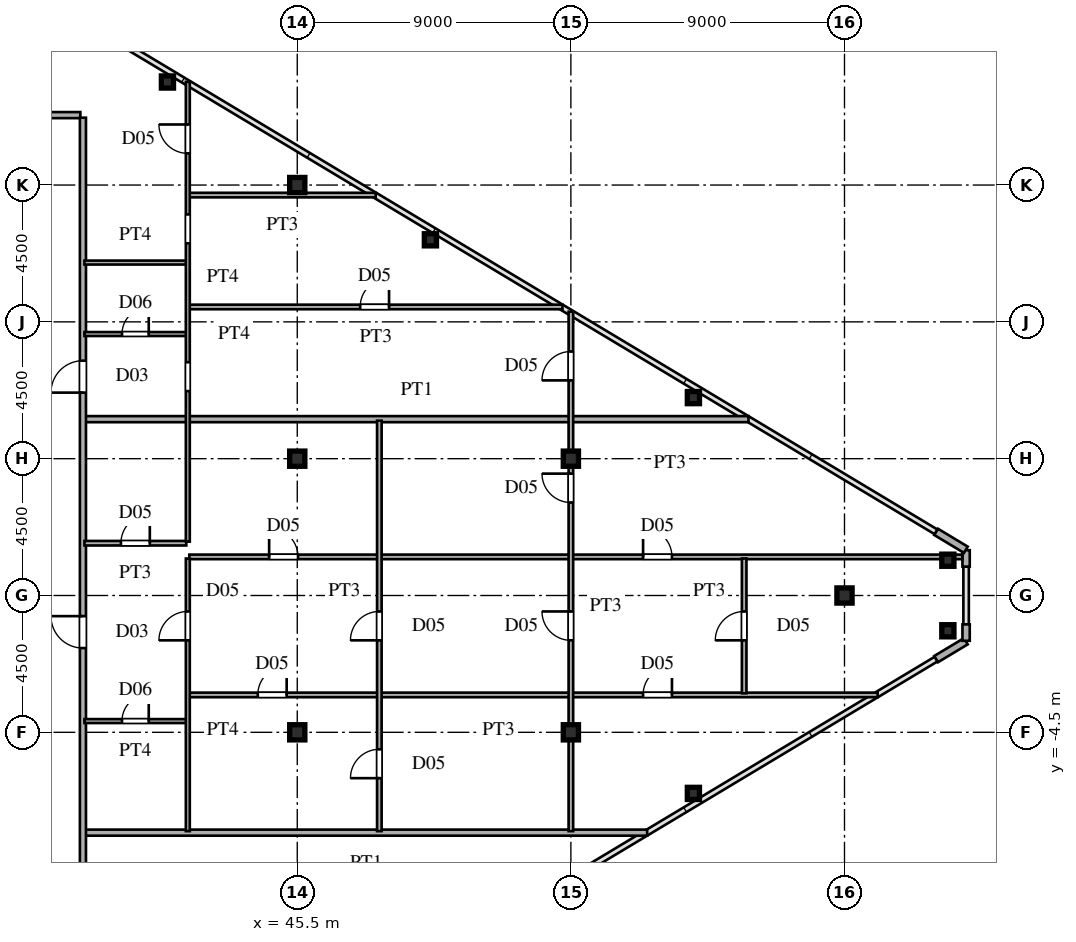
"""IFC4 building model, lengths in metres.
Left out: names, types, materials, properties, quantities, classifications, styles, units other than length and angle.
Written with IfcOpenShell. Run it as: python <this file> out.ifc"""

import sys

from ifc_helpers import new_model, si_unit, direction, frame, frame_2d, origin, origin_2d, place, context, subcontext, project, spatial, rectangle, hollow_rectangle, i_section, extrude, source, transform, mapped, element, fill, save


model = new_model("IFC4")
c1 = context("Model", 3, precision=1e-05, world=origin(), true_north=direction((0.0, 1.0)))
c2 = subcontext(c1, "Body", "Model", "MODEL_VIEW")
j1 = project(units=[si_unit("LENGTHUNIT", "METRE"), si_unit("PLANEANGLEUNIT", "RADIAN")], contexts=[c1])
p1 = place(None, origin())
s1 = spatial("IfcSite", under=j1, at=p1, CompositionType="ELEMENT")
p2 = place(p1, origin())
s2 = spatial("IfcBuilding", under=s1, at=p2, CompositionType="ELEMENT")
p3 = place(p2, frame((0.0, 0.0, 199.5)))
s3 = spatial("IfcBuildingStorey", under=s2, at=p3, CompositionType="ELEMENT", Elevation=199.5)
m1 = source(origin(), c2, "Body", "SweptSolid", [
    extrude(i_section(OverallWidth=0.5, OverallDepth=0.5, WebThickness=0.02, FlangeThickness=0.032, at=origin_2d()), origin(), (0.0, 0.0, 1.0), 3.6),
])
for number, where, z_axis, x_axis in (
    (1, (45.5, -4.5, 0.0), (0.0, 0.0, 1.0), (1.0, 0.0, 0.0)),
    (2, (45.5, 4.5, 0.0), (0.0, 0.0, 1.0), (1.0, 0.0, 0.0)),
    (3, (45.5, 13.5, 0.0), (0.0, 0.0, 1.0), (1.0, 0.0, 0.0)),
    (4, (54.5, -4.5, 0.0), (0.0, 0.0, 1.0), (1.0, 0.0, 0.0)),
    (5, (54.5, 4.5, 0.0), (0.0, 0.0, 1.0), (1.0, 0.0, 0.0)),
    (6, (63.5, 0.0, 0.0), (0.0, 0.0, 1.0), (1.0, 0.0, 0.0)),
):
    element("IfcColumn", number, at=place(p3, frame(where, z_axis=z_axis, x_axis=x_axis)), inside=s3, PredefinedType="COLUMN", context=c2, shape_type="MappedRepresentation", body=[
        mapped(m1, transform((0.0, 0.0, 0.0), scale=1.0)),
    ])
m2 = source(origin(), c2, "Body", "SweptSolid", [
    extrude(hollow_rectangle(XDim=0.4, YDim=0.4, WallThickness=0.016, at=origin_2d()), origin(), (0.0, 0.0, 1.0), 3.6),
])
for number, where, z_axis, x_axis in (
    (7, (66.9, -1.16, 0.0), (0.0, 0.0, 1.0), (1.0, 0.0, 0.0)),
    (8, (66.9, 1.16, 0.0), (0.0, 0.0, 1.0), (1.0, 0.0, 0.0)),
    (9, (58.53, -6.509, 0.0), (0.0, 0.0, 1.0), (1.0, 0.0, 0.0)),
    (10, (41.23, 16.889, 0.0), (0.0, 0.0, 1.0), (1.0, 0.0, 0.0)),
    (11, (49.88, 11.699, 0.0), (0.0, 0.0, 1.0), (1.0, 0.0, 0.0)),
    (12, (58.53, 6.509, 0.0), (0.0, 0.0, 1.0), (1.0, 0.0, 0.0)),
):
    element("IfcColumn", number, at=place(p3, frame(where, z_axis=z_axis, x_axis=x_axis)), inside=s3, PredefinedType="COLUMN", context=c2, shape_type="MappedRepresentation", body=[
        mapped(m2, transform((0.0, 0.0, 0.0), scale=1.0)),
    ])
p4 = place(p3, frame((66.514, -2.092, 0.0), z_axis=(0.0, 0.0, 1.0), x_axis=(0.85743623509, 0.514590228002, 0.0)))
e13 = element("IfcWall", 13, at=p4, inside=s3, PredefinedType="SOLIDWALL", context=c2, shape_type="SweptSolid", body=[
    extrude(rectangle(XDim=1.14, YDim=0.24, at=frame_2d((0.57, 0.0))), origin(), (0.0, 0.0, 1.0), 3.38),
])
for number, where, z_axis, x_axis in (
    (14, (67.5, -1.49, 0.0), (0.0, 0.0, 1.0), (0.0, 1.0, 0.0)),
    (15, (67.5, 0.95, 0.0), (0.0, 0.0, 1.0), (0.0, 1.0, 0.0)),
):
    element("IfcWall", number, at=place(p3, frame(where, z_axis=z_axis, x_axis=x_axis)), inside=s3, PredefinedType="SOLIDWALL", context=c2, shape_type="SweptSolid", body=[
        extrude(rectangle(XDim=0.54, YDim=0.24, at=frame_2d((0.27, 0.0))), origin(), (0.0, 0.0, 1.0), 3.38),
    ])
p5 = place(p3, frame((67.491, 1.505, 0.0), z_axis=(0.0, 0.0, 1.0), x_axis=(-0.85743623509, 0.514590228002, 0.0)))
e16 = element("IfcWall", 16, at=p5, inside=s3, PredefinedType="SOLIDWALL", context=c2, shape_type="SweptSolid", body=[
    extrude(rectangle(XDim=1.14, YDim=0.24, at=frame_2d((0.57, 0.0))), origin(), (0.0, 0.0, 1.0), 3.38),
])
p6 = place(p3, frame((38.53, -7.8, 0.0), z_axis=(0.0, 0.0, 1.0), x_axis=(1.0, 0.0, 0.0)))
e17 = element("IfcWall", 17, at=p6, inside=s3, PredefinedType="PARTITIONING", context=c2, shape_type="SweptSolid", body=[
    extrude(rectangle(XDim=18.48, YDim=0.2, at=frame_2d((9.24, 0.0))), origin(), (0.0, 0.0, 1.0), 3.38),
])
p7 = place(p3, frame((38.5, -4.13, 0.0), z_axis=(0.0, 0.0, 1.0), x_axis=(1.0, 0.0, 0.0)))
e18 = element("IfcWall", 18, at=p7, inside=s3, PredefinedType="PARTITIONING", context=c2, shape_type="SweptSolid", body=[
    extrude(rectangle(XDim=3.35, YDim=0.13, at=frame_2d((1.675, 0.0))), origin(), (0.0, 0.0, 1.0), 3.38),
])
p8 = place(p7, frame((1.235, 0.0, 0.0)))
e19 = element("IfcOpeningElement", 19, at=p8, cuts=e18, PredefinedType="OPENING", context=c2, shape_type="SweptSolid", body=[
    extrude(rectangle(XDim=0.88, YDim=2.1, at=frame_2d((0.44, 1.05))), frame((0.0, 0.075, 0.0), z_axis=(0.0, -1.0, 0.0), x_axis=(1.0, 0.0, 0.0)), (0.0, 0.0, 1.0), 0.15),
])
p9 = place(p3, frame((41.95, -3.27, 0.0), z_axis=(0.0, 0.0, 1.0), x_axis=(1.0, 0.0, 0.0)))
e20 = element("IfcWall", 20, at=p9, inside=s3, PredefinedType="PARTITIONING", context=c2, shape_type="SweptSolid", body=[
    extrude(rectangle(XDim=22.641, YDim=0.15, at=frame_2d((11.321, 0.0))), origin(), (0.0, 0.0, 1.0), 3.38),
])
p10 = place(p9, frame((2.252, 0.0, 0.0)))
e21 = element("IfcOpeningElement", 21, at=p10, cuts=e20, PredefinedType="OPENING", context=c2, shape_type="SweptSolid", body=[
    extrude(rectangle(XDim=0.95, YDim=2.15, at=frame_2d((0.475, 1.075))), frame((0.0, 0.085, 0.0), z_axis=(0.0, -1.0, 0.0), x_axis=(1.0, 0.0, 0.0)), (0.0, 0.0, 1.0), 0.17),
])
p11 = place(p9, frame((14.925, 0.0, 0.0)))
e22 = element("IfcOpeningElement", 22, at=p11, cuts=e20, PredefinedType="OPENING", context=c2, shape_type="SweptSolid", body=[
    extrude(rectangle(XDim=0.95, YDim=2.15, at=frame_2d((0.475, 1.075))), frame((0.0, 0.085, 0.0), z_axis=(0.0, -1.0, 0.0), x_axis=(1.0, 0.0, 0.0)), (0.0, 0.0, 1.0), 0.17),
])
p12 = place(p3, frame((41.95, 1.27, 0.0), z_axis=(0.0, 0.0, 1.0), x_axis=(1.0, 0.0, 0.0)))
e23 = element("IfcWall", 23, at=p12, inside=s3, PredefinedType="PARTITIONING", context=c2, shape_type="SweptSolid", body=[
    extrude(rectangle(XDim=25.425, YDim=0.15, at=frame_2d((12.712, 0.0))), origin(), (0.0, 0.0, 1.0), 3.38),
])
p13 = place(p12, frame((2.625, 0.0, 0.0)))
e24 = element("IfcOpeningElement", 24, at=p13, cuts=e23, PredefinedType="OPENING", context=c2, shape_type="SweptSolid", body=[
    extrude(rectangle(XDim=0.95, YDim=2.15, at=frame_2d((0.475, 1.075))), frame((0.0, 0.085, 0.0), z_axis=(0.0, -1.0, 0.0), x_axis=(1.0, 0.0, 0.0)), (0.0, 0.0, 1.0), 0.17),
])
p14 = place(p12, frame((14.925, 0.0, 0.0)))
e25 = element("IfcOpeningElement", 25, at=p14, cuts=e23, PredefinedType="OPENING", context=c2, shape_type="SweptSolid", body=[
    extrude(rectangle(XDim=0.95, YDim=2.15, at=frame_2d((0.475, 1.075))), frame((0.0, 0.085, 0.0), z_axis=(0.0, -1.0, 0.0), x_axis=(1.0, 0.0, 0.0)), (0.0, 0.0, 1.0), 0.17),
])
p15 = place(p3, frame((38.5, 1.72, 0.0), z_axis=(0.0, 0.0, 1.0), x_axis=(1.0, 0.0, 0.0)))
e26 = element("IfcWall", 26, at=p15, inside=s3, PredefinedType="PARTITIONING", context=c2, shape_type="SweptSolid", body=[
    extrude(rectangle(XDim=3.35, YDim=0.15, at=frame_2d((1.675, 0.0))), origin(), (0.0, 0.0, 1.0), 3.38),
])
p16 = place(p15, frame((1.2, 0.0, 0.0)))
e27 = element("IfcOpeningElement", 27, at=p16, cuts=e26, PredefinedType="OPENING", context=c2, shape_type="SweptSolid", body=[
    extrude(rectangle(XDim=0.95, YDim=2.15, at=frame_2d((0.475, 1.075))), frame((0.0, 0.085, 0.0), z_axis=(0.0, -1.0, 0.0), x_axis=(1.0, 0.0, 0.0)), (0.0, 0.0, 1.0), 0.17),
])
p17 = place(p3, frame((38.53, 5.8, 0.0), z_axis=(0.0, 0.0, 1.0), x_axis=(1.0, 0.0, 0.0)))
e28 = element("IfcWall", 28, at=p17, inside=s3, PredefinedType="PARTITIONING", context=c2, shape_type="SweptSolid", body=[
    extrude(rectangle(XDim=21.813, YDim=0.2, at=frame_2d((10.906, 0.0))), origin(), (0.0, 0.0, 1.0), 3.38),
])
p18 = place(p3, frame((38.5, 8.6, 0.0), z_axis=(0.0, 0.0, 1.0), x_axis=(1.0, 0.0, 0.0)))
e29 = element("IfcWall", 29, at=p18, inside=s3, PredefinedType="PARTITIONING", context=c2, shape_type="SweptSolid", body=[
    extrude(rectangle(XDim=3.35, YDim=0.13, at=frame_2d((1.675, 0.0))), origin(), (0.0, 0.0, 1.0), 3.38),
])
p19 = place(p18, frame((1.235, 0.0, 0.0)))
e30 = element("IfcOpeningElement", 30, at=p19, cuts=e29, PredefinedType="OPENING", context=c2, shape_type="SweptSolid", body=[
    extrude(rectangle(XDim=0.88, YDim=2.1, at=frame_2d((0.44, 1.05))), frame((0.0, 0.075, 0.0), z_axis=(0.0, -1.0, 0.0), x_axis=(1.0, 0.0, 0.0)), (0.0, 0.0, 1.0), 0.15),
])
p20 = place(p3, frame((41.95, 9.49, 0.0), z_axis=(0.0, 0.0, 1.0), x_axis=(1.0, 0.0, 0.0)))
e31 = element("IfcWall", 31, at=p20, inside=s3, PredefinedType="PARTITIONING", context=c2, shape_type="SweptSolid", body=[
    extrude(rectangle(XDim=12.274, YDim=0.15, at=frame_2d((6.137, 0.0))), origin(), (0.0, 0.0, 1.0), 3.38),
])
p21 = place(p20, frame((5.619, 0.0, 0.0)))
e32 = element("IfcOpeningElement", 32, at=p21, cuts=e31, PredefinedType="OPENING", context=c2, shape_type="SweptSolid", body=[
    extrude(rectangle(XDim=0.95, YDim=2.15, at=frame_2d((0.475, 1.075))), frame((0.0, 0.085, 0.0), z_axis=(0.0, -1.0, 0.0), x_axis=(1.0, 0.0, 0.0)), (0.0, 0.0, 1.0), 0.17),
])
p22 = place(p3, frame((38.5, 10.95, 0.0), z_axis=(0.0, 0.0, 1.0), x_axis=(1.0, 0.0, 0.0)))
e33 = element("IfcWall", 33, at=p22, inside=s3, PredefinedType="PARTITIONING", context=c2, shape_type="SweptSolid", body=[
    extrude(rectangle(XDim=3.35, YDim=0.13, at=frame_2d((1.675, 0.0))), origin(), (0.0, 0.0, 1.0), 3.38),
])
p23 = place(p3, frame((41.95, 13.17, 0.0), z_axis=(0.0, 0.0, 1.0), x_axis=(1.0, 0.0, 0.0)))
e34 = element("IfcWall", 34, at=p23, inside=s3, PredefinedType="PARTITIONING", context=c2, shape_type="SweptSolid", body=[
    extrude(rectangle(XDim=6.13, YDim=0.15, at=frame_2d((3.065, 0.0))), origin(), (0.0, 0.0, 1.0), 3.38),
])
p24 = place(p3, frame((27.625, 15.8, 0.0), z_axis=(0.0, 0.0, 1.0), x_axis=(1.0, 0.0, 0.0)))
e35 = element("IfcWall", 35, at=p24, inside=s3, PredefinedType="PARTITIONING", context=c2, shape_type="SweptSolid", body=[
    extrude(rectangle(XDim=10.74, YDim=0.2, at=frame_2d((5.37, 0.0))), origin(), (0.0, 0.0, 1.0), 3.38),
])
p25 = place(p3, frame((38.45, -15.715, 0.0), z_axis=(0.0, 0.0, 1.0), x_axis=(0.0, 1.0, 0.0)))
e36 = element("IfcWall", 36, at=p25, inside=s3, PredefinedType="PARTITIONING", context=c2, shape_type="SweptSolid", body=[
    extrude(rectangle(XDim=31.43, YDim=0.2, at=frame_2d((15.715, 0.0))), origin(), (0.0, 0.0, 1.0), 3.38),
])
p26 = place(p25, frame((3.39, 0.0, 0.0)))
e37 = element("IfcOpeningElement", 37, at=p26, cuts=e36, PredefinedType="OPENING", context=c2, shape_type="SweptSolid", body=[
    extrude(rectangle(XDim=1.05, YDim=2.25, at=frame_2d((0.525, 1.125))), frame((0.0, 0.11, 0.0), z_axis=(0.0, -1.0, 0.0), x_axis=(1.0, 0.0, 0.0)), (0.0, 0.0, 1.0), 0.22),
])
p27 = place(p25, frame((13.986, 0.0, 0.0)))
e38 = element("IfcOpeningElement", 38, at=p27, cuts=e36, PredefinedType="OPENING", context=c2, shape_type="SweptSolid", body=[
    extrude(rectangle(XDim=1.05, YDim=2.25, at=frame_2d((0.525, 1.125))), frame((0.0, 0.11, 0.0), z_axis=(0.0, -1.0, 0.0), x_axis=(1.0, 0.0, 0.0)), (0.0, 0.0, 1.0), 0.22),
])
p28 = place(p25, frame((22.387, 0.0, 0.0)))
e39 = element("IfcOpeningElement", 39, at=p28, cuts=e36, PredefinedType="OPENING", context=c2, shape_type="SweptSolid", body=[
    extrude(rectangle(XDim=1.05, YDim=2.25, at=frame_2d((0.525, 1.125))), frame((0.0, 0.11, 0.0), z_axis=(0.0, -1.0, 0.0), x_axis=(1.0, 0.0, 0.0)), (0.0, 0.0, 1.0), 0.22),
])
p29 = place(p3, frame((41.9, -7.75, 0.0), z_axis=(0.0, 0.0, 1.0), x_axis=(0.0, 1.0, 0.0)))
e40 = element("IfcWall", 40, at=p29, inside=s3, PredefinedType="PARTITIONING", context=c2, shape_type="SweptSolid", body=[
    extrude(rectangle(XDim=8.967, YDim=0.13, at=frame_2d((4.483, 0.0))), origin(), (0.0, 0.0, 1.0), 3.38),
])
p30 = place(p29, frame((6.275, 0.0, 0.0)))
e41 = element("IfcOpeningElement", 41, at=p30, cuts=e40, PredefinedType="OPENING", context=c2, shape_type="SweptSolid", body=[
    extrude(rectangle(XDim=0.95, YDim=2.15, at=frame_2d((0.475, 1.075))), frame((0.0, 0.075, 0.0), z_axis=(0.0, -1.0, 0.0), x_axis=(1.0, 0.0, 0.0)), (0.0, 0.0, 1.0), 0.15),
])
p31 = place(p3, frame((41.9, 1.772, 0.0), z_axis=(0.0, 0.0, 1.0), x_axis=(0.0, 1.0, 0.0)))
e42 = element("IfcWall", 42, at=p31, inside=s3, PredefinedType="PARTITIONING", context=c2, shape_type="SweptSolid", body=[
    extrude(rectangle(XDim=15.123, YDim=0.13, at=frame_2d((7.562, 0.0))), origin(), (0.0, 0.0, 1.0), 3.38),
])
p32 = place(p31, frame((4.95, 0.0, 0.0)))
e43 = element("IfcOpeningElement", 43, at=p32, cuts=e42, PredefinedType="OPENING", context=c2, shape_type="SweptSolid", body=[
    extrude(rectangle(XDim=0.95, YDim=2.15, at=frame_2d((0.475, 1.075))), frame((0.0, 0.075, 0.0), z_axis=(0.0, -1.0, 0.0), x_axis=(1.0, 0.0, 0.0)), (0.0, 0.0, 1.0), 0.15),
])
p33 = place(p31, frame((9.812, 0.0, 0.0)))
e44 = element("IfcOpeningElement", 44, at=p33, cuts=e42, PredefinedType="OPENING", context=c2, shape_type="SweptSolid", body=[
    extrude(rectangle(XDim=0.95, YDim=2.15, at=frame_2d((0.475, 1.075))), frame((0.0, 0.075, 0.0), z_axis=(0.0, -1.0, 0.0), x_axis=(1.0, 0.0, 0.0)), (0.0, 0.0, 1.0), 0.15),
])
p34 = place(p31, frame((12.77, 0.0, 0.0)))
e45 = element("IfcOpeningElement", 45, at=p34, cuts=e42, PredefinedType="OPENING", context=c2, shape_type="SweptSolid", body=[
    extrude(rectangle(XDim=0.95, YDim=2.15, at=frame_2d((0.475, 1.075))), frame((0.0, 0.075, 0.0), z_axis=(0.0, -1.0, 0.0), x_axis=(1.0, 0.0, 0.0)), (0.0, 0.0, 1.0), 0.15),
])
p35 = place(p3, frame((48.2, -7.75, 0.0), z_axis=(0.0, 0.0, 1.0), x_axis=(0.0, 1.0, 0.0)))
e46 = element("IfcWall", 46, at=p35, inside=s3, PredefinedType="PARTITIONING", context=c2, shape_type="SweptSolid", body=[
    extrude(rectangle(XDim=13.5, YDim=0.15, at=frame_2d((6.75, 0.0))), origin(), (0.0, 0.0, 1.0), 3.38),
])
p36 = place(p35, frame((6.275, 0.0, 0.0)))
e47 = element("IfcOpeningElement", 47, at=p36, cuts=e46, PredefinedType="OPENING", context=c2, shape_type="SweptSolid", body=[
    extrude(rectangle(XDim=0.95, YDim=2.15, at=frame_2d((0.475, 1.075))), frame((0.0, 0.085, 0.0), z_axis=(0.0, -1.0, 0.0), x_axis=(1.0, 0.0, 0.0)), (0.0, 0.0, 1.0), 0.17),
])
p37 = place(p35, frame((1.742, 0.0, 0.0)))
e48 = element("IfcOpeningElement", 48, at=p37, cuts=e46, PredefinedType="OPENING", context=c2, shape_type="SweptSolid", body=[
    extrude(rectangle(XDim=0.95, YDim=2.15, at=frame_2d((0.475, 1.075))), frame((0.0, 0.085, 0.0), z_axis=(0.0, -1.0, 0.0), x_axis=(1.0, 0.0, 0.0)), (0.0, 0.0, 1.0), 0.17),
])
p38 = place(p3, frame((54.5, -7.75, 0.0), z_axis=(0.0, 0.0, 1.0), x_axis=(0.0, 1.0, 0.0)))
e49 = element("IfcWall", 49, at=p38, inside=s3, PredefinedType="PARTITIONING", context=c2, shape_type="SweptSolid", body=[
    extrude(rectangle(XDim=17.085, YDim=0.15, at=frame_2d((8.542, 0.0))), origin(), (0.0, 0.0, 1.0), 2.78),
])
p39 = place(p38, frame((6.275, 0.0, 0.0)))
e50 = element("IfcOpeningElement", 50, at=p39, cuts=e49, PredefinedType="OPENING", context=c2, shape_type="SweptSolid", body=[
    extrude(rectangle(XDim=0.95, YDim=2.15, at=frame_2d((0.475, 1.075))), frame((0.0, 0.085, 0.0), z_axis=(0.0, -1.0, 0.0), x_axis=(1.0, 0.0, 0.0)), (0.0, 0.0, 1.0), 0.17),
])
p40 = place(p38, frame((10.808, 0.0, 0.0)))
e51 = element("IfcOpeningElement", 51, at=p40, cuts=e49, PredefinedType="OPENING", context=c2, shape_type="SweptSolid", body=[
    extrude(rectangle(XDim=0.95, YDim=2.15, at=frame_2d((0.475, 1.075))), frame((0.0, 0.085, 0.0), z_axis=(0.0, -1.0, 0.0), x_axis=(1.0, 0.0, 0.0)), (0.0, 0.0, 1.0), 0.17),
])
p41 = place(p38, frame((14.825, 0.0, 0.0)))
e52 = element("IfcOpeningElement", 52, at=p41, cuts=e49, PredefinedType="OPENING", context=c2, shape_type="SweptSolid", body=[
    extrude(rectangle(XDim=0.95, YDim=2.15, at=frame_2d((0.475, 1.075))), frame((0.0, 0.085, 0.0), z_axis=(0.0, -1.0, 0.0), x_axis=(1.0, 0.0, 0.0)), (0.0, 0.0, 1.0), 0.17),
])
p42 = place(p3, frame((60.2, -3.217, 0.0), z_axis=(0.0, 0.0, 1.0), x_axis=(0.0, 1.0, 0.0)))
e53 = element("IfcWall", 53, at=p42, inside=s3, PredefinedType="PARTITIONING", context=c2, shape_type="SweptSolid", body=[
    extrude(rectangle(XDim=4.434, YDim=0.15, at=frame_2d((2.217, 0.0))), origin(), (0.0, 0.0, 1.0), 3.38),
])
p43 = place(p42, frame((1.742, 0.0, 0.0)))
e54 = element("IfcOpeningElement", 54, at=p43, cuts=e53, PredefinedType="OPENING", context=c2, shape_type="SweptSolid", body=[
    extrude(rectangle(XDim=0.95, YDim=2.15, at=frame_2d((0.475, 1.075))), frame((0.0, 0.085, 0.0), z_axis=(0.0, -1.0, 0.0), x_axis=(1.0, 0.0, 0.0)), (0.0, 0.0, 1.0), 0.17),
])
m3 = source(origin(), c2, "Body", "SweptSolid", [
    extrude(rectangle(XDim=0.88, YDim=2.1, at=frame_2d((0.44, 1.05))), frame((0.0, 0.025, 0.0), z_axis=(0.0, -1.0, 0.0), x_axis=(1.0, 0.0, 0.0)), (0.0, 0.0, 1.0), 0.05),
])
p44 = place(p8, origin())
e55 = element("IfcDoor", 55, at=p44, inside=s3, OperationType="SINGLE_SWING_RIGHT", PredefinedType="DOOR", context=c2, shape_type="MappedRepresentation", body=[
    mapped(m3, transform((0.0, 0.0, 0.0), scale=1.0)),
])
fill(e19, e55)
m4 = source(origin(), c2, "Body", "SweptSolid", [
    extrude(rectangle(XDim=0.95, YDim=2.15, at=frame_2d((0.475, 1.075))), frame((0.0, 0.025, 0.0), z_axis=(0.0, -1.0, 0.0), x_axis=(1.0, 0.0, 0.0)), (0.0, 0.0, 1.0), 0.05),
])
p45 = place(p10, origin())
e56 = element("IfcDoor", 56, at=p45, inside=s3, OperationType="SINGLE_SWING_RIGHT", PredefinedType="DOOR", context=c2, shape_type="MappedRepresentation", body=[
    mapped(m4, transform((0.0, 0.0, 0.0), scale=1.0)),
])
fill(e21, e56)
p46 = place(p11, origin())
e57 = element("IfcDoor", 57, at=p46, inside=s3, OperationType="SINGLE_SWING_RIGHT", PredefinedType="DOOR", context=c2, shape_type="MappedRepresentation", body=[
    mapped(m4, transform((0.0, 0.0, 0.0), scale=1.0)),
])
fill(e22, e57)
p47 = place(p13, origin())
e58 = element("IfcDoor", 58, at=p47, inside=s3, OperationType="SINGLE_SWING_LEFT", PredefinedType="DOOR", context=c2, shape_type="MappedRepresentation", body=[
    mapped(m4, transform((0.0, 0.0, 0.0), scale=1.0)),
])
fill(e24, e58)
p48 = place(p14, origin())
e59 = element("IfcDoor", 59, at=p48, inside=s3, OperationType="SINGLE_SWING_LEFT", PredefinedType="DOOR", context=c2, shape_type="MappedRepresentation", body=[
    mapped(m4, transform((0.0, 0.0, 0.0), scale=1.0)),
])
fill(e25, e59)
p49 = place(p16, origin())
e60 = element("IfcDoor", 60, at=p49, inside=s3, OperationType="SINGLE_SWING_RIGHT", PredefinedType="DOOR", context=c2, shape_type="MappedRepresentation", body=[
    mapped(m4, transform((0.0, 0.0, 0.0), scale=1.0)),
])
fill(e27, e60)
p50 = place(p19, origin())
e61 = element("IfcDoor", 61, at=p50, inside=s3, OperationType="SINGLE_SWING_RIGHT", PredefinedType="DOOR", context=c2, shape_type="MappedRepresentation", body=[
    mapped(m3, transform((0.0, 0.0, 0.0), scale=1.0)),
])
fill(e30, e61)
p51 = place(p21, origin())
e62 = element("IfcDoor", 62, at=p51, inside=s3, OperationType="SINGLE_SWING_RIGHT", PredefinedType="DOOR", context=c2, shape_type="MappedRepresentation", body=[
    mapped(m4, transform((0.0, 0.0, 0.0), scale=1.0)),
])
fill(e32, e62)
m5 = source(origin(), c2, "Body", "SweptSolid", [
    extrude(rectangle(XDim=1.05, YDim=2.25, at=frame_2d((0.525, 1.125))), frame((0.0, 0.025, 0.0), z_axis=(0.0, -1.0, 0.0), x_axis=(1.0, 0.0, 0.0)), (0.0, 0.0, 1.0), 0.05),
])
p52 = place(p27, origin())
e63 = element("IfcDoor", 63, at=p52, inside=s3, OperationType="SINGLE_SWING_RIGHT", PredefinedType="DOOR", context=c2, shape_type="MappedRepresentation", body=[
    mapped(m5, transform((0.0, 0.0, 0.0), scale=1.0)),
])
fill(e38, e63)
p53 = place(p28, origin())
e64 = element("IfcDoor", 64, at=p53, inside=s3, OperationType="SINGLE_SWING_LEFT", PredefinedType="DOOR", context=c2, shape_type="MappedRepresentation", body=[
    mapped(m5, transform((0.0, 0.0, 0.0), scale=1.0)),
])
fill(e39, e64)
p54 = place(p30, origin())
e65 = element("IfcDoor", 65, at=p54, inside=s3, OperationType="SINGLE_SWING_LEFT", PredefinedType="DOOR", context=c2, shape_type="MappedRepresentation", body=[
    mapped(m4, transform((0.0, 0.0, 0.0), scale=1.0)),
])
fill(e41, e65)
p55 = place(p34, origin())
e66 = element("IfcDoor", 66, at=p55, inside=s3, OperationType="SINGLE_SWING_RIGHT", PredefinedType="DOOR", context=c2, shape_type="MappedRepresentation", body=[
    mapped(m4, transform((0.0, 0.0, 0.0), scale=1.0)),
])
fill(e45, e66)
p56 = place(p36, origin())
e67 = element("IfcDoor", 67, at=p56, inside=s3, OperationType="SINGLE_SWING_LEFT", PredefinedType="DOOR", context=c2, shape_type="MappedRepresentation", body=[
    mapped(m4, transform((0.0, 0.0, 0.0), scale=1.0)),
])
fill(e47, e67)
p57 = place(p37, origin())
e68 = element("IfcDoor", 68, at=p57, inside=s3, OperationType="SINGLE_SWING_LEFT", PredefinedType="DOOR", context=c2, shape_type="MappedRepresentation", body=[
    mapped(m4, transform((0.0, 0.0, 0.0), scale=1.0)),
])
fill(e48, e68)
p58 = place(p39, origin())
e69 = element("IfcDoor", 69, at=p58, inside=s3, OperationType="SINGLE_SWING_RIGHT", PredefinedType="DOOR", context=c2, shape_type="MappedRepresentation", body=[
    mapped(m4, transform((0.0, 0.0, 0.0), scale=1.0)),
])
fill(e50, e69)
p59 = place(p40, origin())
e70 = element("IfcDoor", 70, at=p59, inside=s3, OperationType="SINGLE_SWING_RIGHT", PredefinedType="DOOR", context=c2, shape_type="MappedRepresentation", body=[
    mapped(m4, transform((0.0, 0.0, 0.0), scale=1.0)),
])
fill(e51, e70)
p60 = place(p41, origin())
e71 = element("IfcDoor", 71, at=p60, inside=s3, OperationType="SINGLE_SWING_LEFT", PredefinedType="DOOR", context=c2, shape_type="MappedRepresentation", body=[
    mapped(m4, transform((0.0, 0.0, 0.0), scale=1.0)),
])
fill(e52, e71)
p61 = place(p43, origin())
e72 = element("IfcDoor", 72, at=p61, inside=s3, OperationType="SINGLE_SWING_LEFT", PredefinedType="DOOR", context=c2, shape_type="MappedRepresentation", body=[
    mapped(m4, transform((0.0, 0.0, 0.0), scale=1.0)),
])
fill(e54, e72)
save(model, sys.argv[1])
